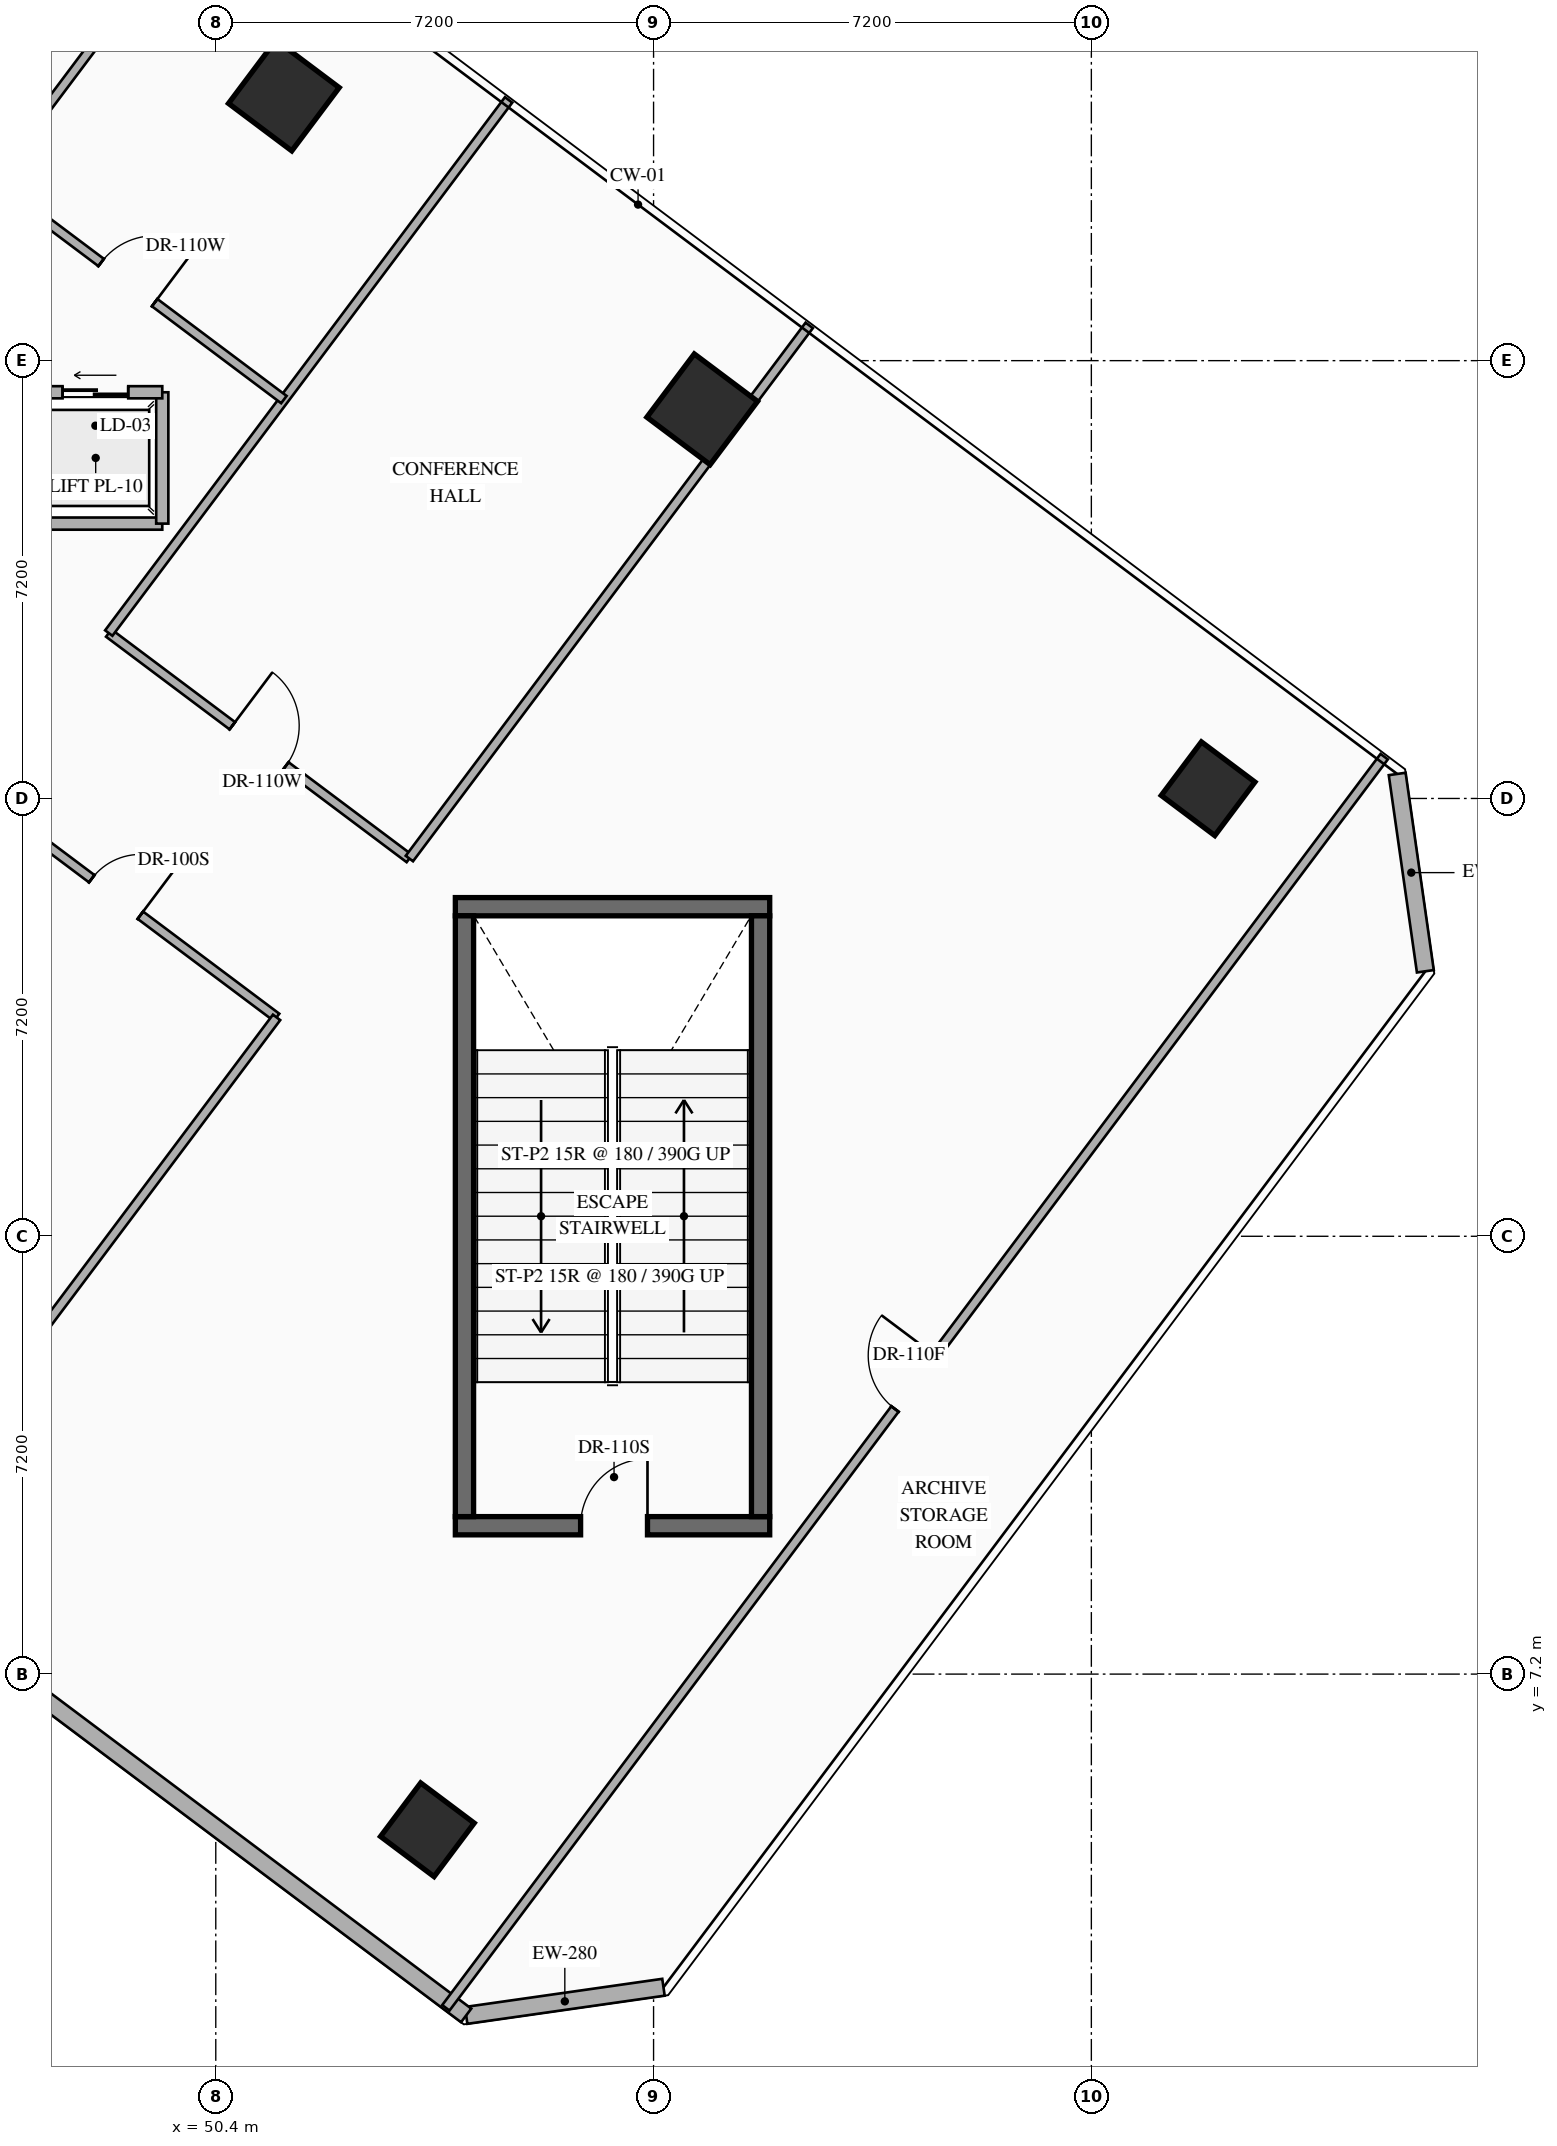
"""IFC4 building model, lengths in metres.
Left out: names, types, materials, properties, quantities, classifications, styles, units other than length and angle.
Written with IfcOpenShell. Run it as: python <this file> out.ifc"""

import sys

from ifc_helpers import new_model, si_unit, direction, frame, frame_2d, origin, origin_2d, place, context, subcontext, project, spatial, rectangle, hollow_rectangle, extrude, element, fill, save


model = new_model("IFC4")
c1 = context("Model", 3, precision=1e-05, world=origin(), true_north=direction((0.0, 1.0)))
c2 = subcontext(c1, "Body", "Model", "MODEL_VIEW")
j1 = project(units=[si_unit("LENGTHUNIT", "METRE"), si_unit("PLANEANGLEUNIT", "RADIAN")], contexts=[c1])
p1 = place(None, origin())
s1 = spatial("IfcSite", under=j1, at=p1, CompositionType="ELEMENT")
p2 = place(p1, origin())
s2 = spatial("IfcBuilding", under=s1, at=p2, CompositionType="ELEMENT")
p3 = place(p2, frame((0.0, 0.0, 10.8)))
s3 = spatial("IfcBuildingStorey", under=s2, at=p3, CompositionType="ELEMENT", Elevation=10.8)
p4 = place(p3, frame((54.34, 9.64, 0.0), z_axis=(0.0, 0.0, 1.0), x_axis=(1.0, 0.0, 0.0)))
e1 = element("IfcWall", 1, at=p4, inside=s3, PredefinedType="SHEAR", context=c2, shape_type="SweptSolid", body=[
    extrude(rectangle(XDim=5.17, YDim=0.3, at=frame_2d((2.585, 0.0))), origin(), (0.0, 0.0, 1.0), 5.4),
])
p5 = place(p4, frame((2.06, 0.0, 0.0)))
e2 = element("IfcOpeningElement", 2, at=p5, cuts=e1, PredefinedType="OPENING", context=c2, shape_type="SweptSolid", body=[
    extrude(rectangle(XDim=1.1, YDim=2.2, at=frame_2d((0.55, 1.1))), frame((0.0, 0.16, 0.0), z_axis=(0.0, -1.0, 0.0), x_axis=(1.0, 0.0, 0.0)), (0.0, 0.0, 1.0), 0.32),
])
p6 = place(p3, frame((54.34, 19.82, 0.0), z_axis=(0.0, 0.0, 1.0), x_axis=(1.0, 0.0, 0.0)))
e3 = element("IfcWall", 3, at=p6, inside=s3, PredefinedType="SHEAR", context=c2, shape_type="SweptSolid", body=[
    extrude(rectangle(XDim=5.17, YDim=0.3, at=frame_2d((2.585, 0.0))), origin(), (0.0, 0.0, 1.0), 5.4),
])
for number, where, z_axis, x_axis in (
    (4, (54.49, 9.79, 0.0), (0.0, 0.0, 1.0), (0.0, 1.0, 0.0)),
    (5, (59.36, 9.79, 0.0), (0.0, 0.0, 1.0), (0.0, 1.0, 0.0)),
):
    element("IfcWall", number, at=place(p3, frame(where, z_axis=z_axis, x_axis=x_axis)), inside=s3, PredefinedType="SHEAR", context=c2, shape_type="SweptSolid", body=[
        extrude(rectangle(XDim=9.88, YDim=0.3, at=frame_2d((4.94, 0.0))), origin(), (0.0, 0.0, 1.0), 5.4),
    ])
for number, where, z_axis, x_axis in (
    (6, (51.52, 33.16, 0.0), (0.0, 0.0, 1.0), (0.8, -0.6, 0.0)),
    (7, (58.4, 28.0, 0.0), (0.0, 0.0, 1.0), (0.8, -0.6, 0.0)),
):
    element("IfcColumn", number, at=place(p3, frame(where, z_axis=z_axis, x_axis=x_axis)), inside=s3, PredefinedType="COLUMN", context=c2, shape_type="SweptSolid", body=[
        extrude(rectangle(XDim=1.3, YDim=1.3, at=origin_2d()), origin(), (0.0, 0.0, 1.0), 5.4),
    ])
for number, where, z_axis, x_axis in (
    (8, (53.88, 4.64, 0.0), (0.0, 0.0, 1.0), (0.8, -0.6, 0.0)),
    (9, (66.72, 21.76, 0.0), (0.0, 0.0, 1.0), (0.8, -0.6, 0.0)),
):
    element("IfcColumn", number, at=place(p3, frame(where, z_axis=z_axis, x_axis=x_axis)), inside=s3, PredefinedType="COLUMN", context=c2, shape_type="SweptSolid", body=[
        extrude(hollow_rectangle(XDim=1.1, YDim=1.1, WallThickness=0.04, at=origin_2d()), origin(), (0.0, 0.0, 1.0), 5.4),
    ])
for number, where, z_axis, x_axis in (
    (10, (69.83, 22.003, 0.0), (0.0, 0.0, 1.0), (0.141, -0.99, 0.0)),
    (11, (57.763, 2.05, 0.0), (0.0, 0.0, 1.0), (-0.99, -0.141, 0.0)),
):
    element("IfcWall", number, at=place(p3, frame(where, z_axis=z_axis, x_axis=x_axis)), inside=s3, PredefinedType="STANDARD", context=c2, shape_type="SweptSolid", body=[
        extrude(rectangle(XDim=3.278, YDim=0.28, at=frame_2d((1.639, 0.0))), origin(), (0.0, 0.0, 1.0), 5.1),
    ])
p7 = place(p3, frame((54.518, 1.587, 0.0), z_axis=(0.0, 0.0, 1.0), x_axis=(-0.800001601415, 0.599997864774, 0.0)))
e12 = element("IfcWall", 12, at=p7, inside=s3, PredefinedType="STANDARD", context=c2, shape_type="SweptSolid", body=[
    extrude(rectangle(XDim=36.589, YDim=0.28, at=frame_2d((18.294, 0.0))), origin(), (0.0, 0.0, 1.0), 5.1),
])
p8 = place(p3, frame((45.12, 26.12, 0.0), z_axis=(0.0, 0.0, 1.0), x_axis=(1.0, 0.0, 0.0)))
e13 = element("IfcWall", 13, at=p8, inside=s3, PredefinedType="STANDARD", context=c2, shape_type="SweptSolid", body=[
    extrude(rectangle(XDim=4.4, YDim=0.2, at=frame_2d((2.2, 0.0))), origin(), (0.0, 0.0, 1.0), 5.1),
])
p9 = place(p3, frame((49.52, 26.12, 0.0), z_axis=(0.0, 0.0, 1.0), x_axis=(0.0, 1.0, 0.0)))
e14 = element("IfcWall", 14, at=p9, inside=s3, PredefinedType="STANDARD", context=c2, shape_type="SweptSolid", body=[
    extrude(rectangle(XDim=2.16, YDim=0.2, at=frame_2d((1.08, 0.0))), origin(), (0.0, 0.0, 1.0), 5.1),
])
p10 = place(p3, frame((45.12, 28.28, 0.0), z_axis=(0.0, 0.0, 1.0), x_axis=(1.0, 0.0, 0.0)))
e15 = element("IfcWall", 15, at=p10, inside=s3, PredefinedType="STANDARD", context=c2, shape_type="SweptSolid", body=[
    extrude(rectangle(XDim=4.4, YDim=0.2, at=frame_2d((2.2, 0.0))), origin(), (0.0, 0.0, 1.0), 5.1),
])
p11 = place(p10, frame((0.56, 0.0, 0.0)))
e16 = element("IfcOpeningElement", 16, at=p11, cuts=e15, PredefinedType="OPENING", context=c2, shape_type="SweptSolid", body=[
    extrude(rectangle(XDim=1.08, YDim=2.15, at=frame_2d((0.54, 1.075))), frame((0.0, 0.11, 0.0), z_axis=(0.0, -1.0, 0.0), x_axis=(1.0, 0.0, 0.0)), (0.0, 0.0, 1.0), 0.22),
])
p12 = place(p10, frame((2.76, 0.0, 0.0)))
e17 = element("IfcOpeningElement", 17, at=p12, cuts=e15, PredefinedType="OPENING", context=c2, shape_type="SweptSolid", body=[
    extrude(rectangle(XDim=1.08, YDim=2.15, at=frame_2d((0.54, 1.075))), frame((0.0, 0.11, 0.0), z_axis=(0.0, -1.0, 0.0), x_axis=(1.0, 0.0, 0.0)), (0.0, 0.0, 1.0), 0.22),
])
p13 = place(p3, frame((48.64, 24.32, 0.0), z_axis=(0.0, 0.0, 1.0), x_axis=(0.80000474051, -0.599993679268, 0.0)))
e18 = element("IfcWall", 18, at=p13, inside=s3, PredefinedType="PARTITIONING", context=c2, shape_type="SweptSolid", body=[
    extrude(rectangle(XDim=6.18, YDim=0.15, at=frame_2d((3.09, 0.0))), origin(), (0.0, 0.0, 1.0), 5.1),
])
p14 = place(p13, frame((2.54, 0.0, 0.0)))
e19 = element("IfcOpeningElement", 19, at=p14, cuts=e18, PredefinedType="OPENING", context=c2, shape_type="SweptSolid", body=[
    extrude(rectangle(XDim=1.1, YDim=2.16, at=frame_2d((0.55, 1.08))), frame((0.0, 0.085, 0.0), z_axis=(0.0, -1.0, 0.0), x_axis=(1.0, 0.0, 0.0)), (0.0, 0.0, 1.0), 0.17),
])
p15 = place(p3, frame((48.64, 24.32, 0.0), z_axis=(0.0, 0.0, 1.0), x_axis=(0.600017820398, 0.799986634391, 0.0)))
e20 = element("IfcWall", 20, at=p15, inside=s3, PredefinedType="PARTITIONING", context=c2, shape_type="SweptSolid", body=[
    extrude(rectangle(XDim=10.96, YDim=0.15, at=frame_2d((5.48, 0.0))), origin(), (0.0, 0.0, 1.0), 5.1),
])
p16 = place(p3, frame((53.584, 20.612, 0.0), z_axis=(0.0, 0.0, 1.0), x_axis=(0.600003564151, 0.799997326874, 0.0)))
e21 = element("IfcWall", 21, at=p16, inside=s3, PredefinedType="PARTITIONING", context=c2, shape_type="SweptSolid", body=[
    extrude(rectangle(XDim=10.96, YDim=0.15, at=frame_2d((5.48, 0.0))), origin(), (0.0, 0.0, 1.0), 5.1),
])
p17 = place(p3, frame((46.12, 21.96, 0.0), z_axis=(0.0, 0.0, 1.0), x_axis=(0.799991121809, -0.600011837406, 0.0)))
e22 = element("IfcWall", 22, at=p17, inside=s3, PredefinedType="PARTITIONING", context=c2, shape_type="SweptSolid", body=[
    extrude(rectangle(XDim=6.6, YDim=0.15, at=frame_2d((3.3, 0.0))), origin(), (0.0, 0.0, 1.0), 5.1),
])
p18 = place(p17, frame((2.8, 0.0, 0.0)))
e23 = element("IfcOpeningElement", 23, at=p18, cuts=e22, PredefinedType="OPENING", context=c2, shape_type="SweptSolid", body=[
    extrude(rectangle(XDim=1.0, YDim=2.15, at=frame_2d((0.5, 1.075))), frame((0.0, 0.085, 0.0), z_axis=(0.0, -1.0, 0.0), x_axis=(1.0, 0.0, 0.0)), (0.0, 0.0, 1.0), 0.17),
])
p19 = place(p3, frame((44.584, 8.912, 0.0), z_axis=(0.0, 0.0, 1.0), x_axis=(0.6, 0.8, 0.0)))
e24 = element("IfcWall", 24, at=p19, inside=s3, PredefinedType="PARTITIONING", context=c2, shape_type="SweptSolid", body=[
    extrude(rectangle(XDim=11.36, YDim=0.15, at=frame_2d((5.68, 0.0))), origin(), (0.0, 0.0, 1.0), 5.1),
])
p20 = place(p3, frame((54.184, 1.712, 0.0), z_axis=(0.0, 0.0, 1.0), x_axis=(0.59999392496, 0.800004556244, 0.0)))
e25 = element("IfcWall", 25, at=p20, inside=s3, PredefinedType="PARTITIONING", context=c2, shape_type="SweptSolid", body=[
    extrude(rectangle(XDim=25.72, YDim=0.15, at=frame_2d((12.86, 0.0))), origin(), (0.0, 0.0, 1.0), 5.1),
])
p21 = place(p20, frame((12.31, 0.0, 0.0)))
e26 = element("IfcOpeningElement", 26, at=p21, cuts=e25, PredefinedType="OPENING", context=c2, shape_type="SweptSolid", body=[
    extrude(rectangle(XDim=1.1, YDim=2.24, at=frame_2d((0.55, 1.12))), frame((0.0, 0.085, 0.0), z_axis=(0.0, -1.0, 0.0), x_axis=(1.0, 0.0, 0.0)), (0.0, 0.0, 1.0), 0.17),
])
p22 = place(p3, frame((46.72, 31.76, 0.0), z_axis=(0.0, 0.0, 1.0), x_axis=(0.79999511724, -0.600006510291, 0.0)))
e27 = element("IfcWall", 27, at=p22, inside=s3, PredefinedType="PARTITIONING", context=c2, shape_type="SweptSolid", body=[
    extrude(rectangle(XDim=6.0, YDim=0.15, at=frame_2d((3.0, 0.0))), origin(), (0.0, 0.0, 1.0), 5.1),
])
p23 = place(p22, frame((2.243, 0.0, 0.0)))
e28 = element("IfcOpeningElement", 28, at=p23, cuts=e27, PredefinedType="OPENING", context=c2, shape_type="SweptSolid", body=[
    extrude(rectangle(XDim=1.1, YDim=2.16, at=frame_2d((0.55, 1.08))), frame((0.0, 0.085, 0.0), z_axis=(0.0, -1.0, 0.0), x_axis=(1.0, 0.0, 0.0)), (0.0, 0.0, 1.0), 0.17),
])
p24 = place(p3, frame((46.72, 31.76, 0.0), z_axis=(0.0, 0.0, 1.0), x_axis=(0.600006341286, 0.799995243996, 0.0)))
e29 = element("IfcWall", 29, at=p24, inside=s3, PredefinedType="PARTITIONING", context=c2, shape_type="SweptSolid", body=[
    extrude(rectangle(XDim=6.16, YDim=0.15, at=frame_2d((3.08, 0.0))), origin(), (0.0, 0.0, 1.0), 5.1),
])
p25 = place(p5, origin())
e30 = element("IfcDoor", 30, at=p25, inside=s3, OperationType="SINGLE_SWING_RIGHT", PredefinedType="DOOR", context=c2, shape_type="SweptSolid", body=[
    extrude(rectangle(XDim=1.1, YDim=2.2, at=frame_2d((0.55, 1.1))), frame((0.0, 0.025, 0.0), z_axis=(0.0, -1.0, 0.0), x_axis=(1.0, 0.0, 0.0)), (0.0, 0.0, 1.0), 0.05),
])
fill(e2, e30)
p26 = place(p12, origin())
e31 = element("IfcDoor", 31, at=p26, inside=s3, OperationType="SLIDING_TO_LEFT", PredefinedType="USERDEFINED", context=c2, shape_type="SweptSolid", body=[
    extrude(rectangle(XDim=1.08, YDim=2.15, at=frame_2d((0.54, 1.075))), frame((0.0, 0.025, 0.0), z_axis=(0.0, -1.0, 0.0), x_axis=(1.0, 0.0, 0.0)), (0.0, 0.0, 1.0), 0.05),
])
fill(e17, e31)
p27 = place(p14, origin())
e32 = element("IfcDoor", 32, at=p27, inside=s3, OperationType="SINGLE_SWING_LEFT", PredefinedType="DOOR", context=c2, shape_type="SweptSolid", body=[
    extrude(rectangle(XDim=1.1, YDim=2.16, at=frame_2d((0.55, 1.08))), frame((0.0, 0.025, 0.0), z_axis=(0.0, -1.0, 0.0), x_axis=(1.0, 0.0, 0.0)), (0.0, 0.0, 1.0), 0.05),
])
fill(e19, e32)
p28 = place(p18, origin())
e33 = element("IfcDoor", 33, at=p28, inside=s3, OperationType="SINGLE_SWING_RIGHT", PredefinedType="DOOR", context=c2, shape_type="SweptSolid", body=[
    extrude(rectangle(XDim=1.0, YDim=2.15, at=frame_2d((0.5, 1.075))), frame((0.0, 0.025, 0.0), z_axis=(0.0, -1.0, 0.0), x_axis=(1.0, 0.0, 0.0)), (0.0, 0.0, 1.0), 0.05),
])
fill(e23, e33)
p29 = place(p21, origin())
e34 = element("IfcDoor", 34, at=p29, inside=s3, OperationType="SINGLE_SWING_RIGHT", PredefinedType="DOOR", context=c2, shape_type="SweptSolid", body=[
    extrude(rectangle(XDim=1.1, YDim=2.24, at=frame_2d((0.55, 1.12))), frame((0.0, 0.025, 0.0), z_axis=(0.0, -1.0, 0.0), x_axis=(1.0, 0.0, 0.0)), (0.0, 0.0, 1.0), 0.05),
])
fill(e26, e34)
p30 = place(p23, origin())
e35 = element("IfcDoor", 35, at=p30, inside=s3, OperationType="SINGLE_SWING_RIGHT", PredefinedType="DOOR", context=c2, shape_type="SweptSolid", body=[
    extrude(rectangle(XDim=1.1, YDim=2.16, at=frame_2d((0.55, 1.08))), frame((0.0, 0.025, 0.0), z_axis=(0.0, -1.0, 0.0), x_axis=(1.0, 0.0, 0.0)), (0.0, 0.0, 1.0), 0.05),
])
fill(e28, e35)
save(model, sys.argv[1])
